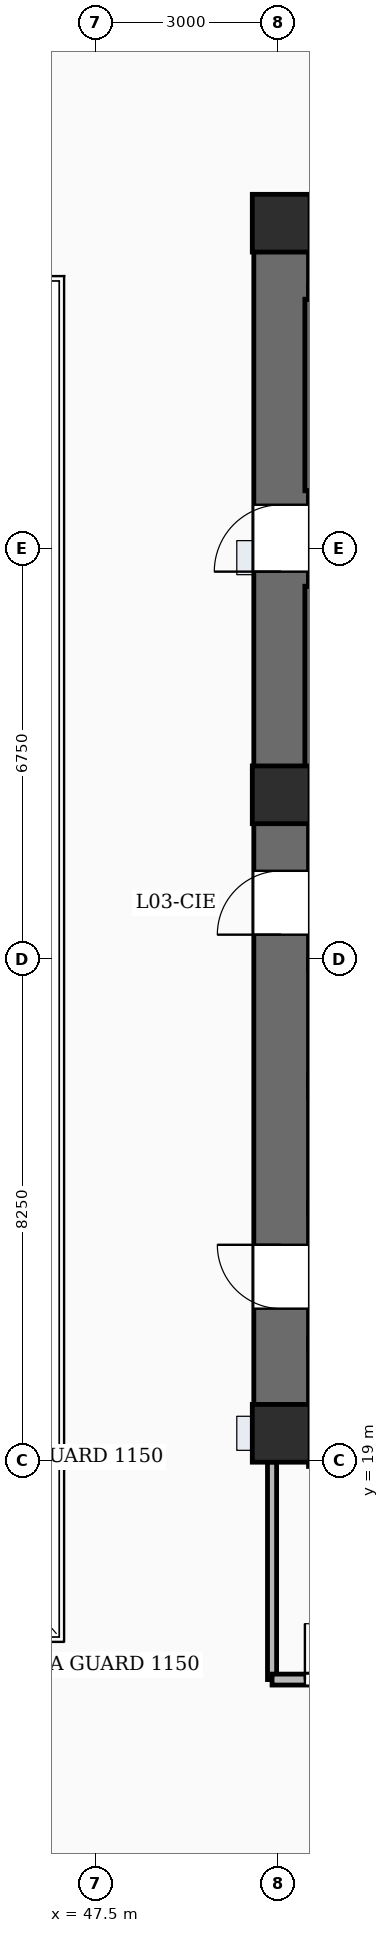
"""IFC4 building model, lengths in metres.
Left out: names, types, materials, properties, quantities, classifications, styles, units other than length and angle.
Written with IfcOpenShell. Run it as: python <this file> out.ifc"""

import sys

from ifc_helpers import new_model, si_unit, direction, frame, frame_2d, origin, origin_2d, place, context, subcontext, project, spatial, rectangle, extrude, element, fill, save


model = new_model("IFC4")
c1 = context("Model", 3, precision=1e-05, world=origin(), true_north=direction((0.0, 1.0)))
c2 = subcontext(c1, "Body", "Model", "MODEL_VIEW")
j1 = project(units=[si_unit("LENGTHUNIT", "METRE"), si_unit("PLANEANGLEUNIT", "RADIAN")], contexts=[c1])
p1 = place(None, origin())
s1 = spatial("IfcSite", under=j1, at=p1, CompositionType="ELEMENT")
p2 = place(p1, origin())
s2 = spatial("IfcBuilding", under=s1, at=p2, CompositionType="ELEMENT")
p3 = place(p2, frame((0.0, 0.0, 18.0)))
s3 = spatial("IfcBuildingStorey", under=s2, at=p3, CompositionType="ELEMENT", Elevation=18.0)
p4 = place(p3, frame((50.55, 19.0, -0.35), z_axis=(0.0, 0.0, 1.0), x_axis=(0.0, 1.0, 0.0)))
e1 = element("IfcWall", 1, at=p4, inside=s3, PredefinedType="SHEAR", context=c2, shape_type="SweptSolid", body=[
    extrude(rectangle(XDim=20.8, YDim=0.9, at=frame_2d((10.4, 0.0))), origin(), (0.0, 0.0, 1.0), 5.0),
])
p5 = place(p4, frame((2.5, 0.0, 0.35)))
e2 = element("IfcOpeningElement", 2, at=p5, cuts=e1, PredefinedType="OPENING", context=c2, shape_type="SweptSolid", body=[
    extrude(rectangle(XDim=1.05, YDim=2.15, at=frame_2d((0.525, 1.075))), frame((0.0, 0.46, 0.0), z_axis=(0.0, -1.0, 0.0), x_axis=(1.0, 0.0, 0.0)), (0.0, 0.0, 1.0), 0.92),
])
p6 = place(p4, frame((8.65, 0.0, 0.35)))
e3 = element("IfcOpeningElement", 3, at=p6, cuts=e1, PredefinedType="OPENING", context=c2, shape_type="SweptSolid", body=[
    extrude(rectangle(XDim=1.05, YDim=2.15, at=frame_2d((0.525, 1.075))), frame((0.0, 0.46, 0.0), z_axis=(0.0, -1.0, 0.0), x_axis=(1.0, 0.0, 0.0)), (0.0, 0.0, 1.0), 0.92),
])
p7 = place(p4, frame((14.62, 0.0, 0.35)))
e4 = element("IfcOpeningElement", 4, at=p7, cuts=e1, PredefinedType="OPENING", context=c2, shape_type="SweptSolid", body=[
    extrude(rectangle(XDim=1.1, YDim=2.15, at=frame_2d((0.55, 1.075))), frame((0.0, 0.46, 0.0), z_axis=(0.0, -1.0, 0.0), x_axis=(1.0, 0.0, 0.0)), (0.0, 0.0, 1.0), 0.92),
])
for number, where, z_axis, x_axis in (
    (5, (51.0, 19.45, -0.35), (0.0, 0.0, 1.0), (1.0, 0.0, 0.0)),
    (6, (51.0, 39.35, -0.35), (0.0, 0.0, 1.0), (1.0, 0.0, 0.0)),
):
    element("IfcWall", number, at=place(p3, frame(where, z_axis=z_axis, x_axis=x_axis)), inside=s3, PredefinedType="SHEAR", context=c2, shape_type="SweptSolid", body=[
        extrude(rectangle(XDim=8.9, YDim=0.9, at=frame_2d((4.45, 0.0))), origin(), (0.0, 0.0, 1.0), 5.0),
    ])
for number, where, z_axis, x_axis in (
    (7, (50.55, 19.45, -0.35), (0.0, 0.0, 1.0), (1.0, 0.0, 0.0)),
    (8, (50.55, 29.95, -0.35), (0.0, 0.0, 1.0), (1.0, 0.0, 0.0)),
    (9, (50.55, 39.35, -0.35), (0.0, 0.0, 1.0), (1.0, 0.0, 0.0)),
):
    element("IfcColumn", number, at=place(p3, frame(where, z_axis=z_axis, x_axis=x_axis)), inside=s3, PredefinedType="COLUMN", context=c2, shape_type="SweptSolid", body=[
        extrude(rectangle(XDim=0.95, YDim=0.95, at=origin_2d()), origin(), (0.0, 0.0, 1.0), 5.0),
    ])
p8 = place(p3, frame((59.9, 30.03, 0.0), z_axis=(0.0, 0.0, 1.0), x_axis=(-1.0, 0.0, 0.0)))
e10 = element("IfcWall", 10, at=p8, inside=s3, PredefinedType="SOLIDWALL", context=c2, shape_type="SweptSolid", body=[
    extrude(rectangle(XDim=8.9, YDim=0.24, at=frame_2d((4.45, 0.0))), origin(), (0.0, 0.0, 1.0), 4.65),
])
p9 = place(p8, frame((7.38, 0.0, 0.0)))
e11 = element("IfcOpeningElement", 11, at=p9, cuts=e10, PredefinedType="OPENING", context=c2, shape_type="SweptSolid", body=[
    extrude(rectangle(XDim=1.1, YDim=2.15, at=frame_2d((0.55, 1.075))), frame((0.0, 0.13, 0.0), z_axis=(0.0, -1.0, 0.0), x_axis=(1.0, 0.0, 0.0)), (0.0, 0.0, 1.0), 0.26),
])
p10 = place(p3, frame((51.0, 33.5, 0.0), z_axis=(0.0, 0.0, 1.0), x_axis=(1.0, 0.0, 0.0)))
e12 = element("IfcWall", 12, at=p10, inside=s3, PredefinedType="SOLIDWALL", context=c2, shape_type="SweptSolid", body=[
    extrude(rectangle(XDim=8.9, YDim=0.24, at=frame_2d((4.45, 0.0))), origin(), (0.0, 0.0, 1.0), 4.65),
])
p11 = place(p3, frame((51.06, 30.15, 0.0), z_axis=(0.0, 0.0, 1.0), x_axis=(0.0, 1.0, 0.0)))
e13 = element("IfcWall", 13, at=p11, inside=s3, PredefinedType="SOLIDWALL", context=c2, shape_type="SweptSolid", body=[
    extrude(rectangle(XDim=3.23, YDim=0.24, at=frame_2d((1.615, 0.0))), origin(), (0.0, 0.0, 1.0), 4.65),
])
p12 = place(p3, frame((59.9, 34.83, 0.0), z_axis=(0.0, 0.0, 1.0), x_axis=(-1.0, 0.0, 0.0)))
e14 = element("IfcWall", 14, at=p12, inside=s3, PredefinedType="SOLIDWALL", context=c2, shape_type="SweptSolid", body=[
    extrude(rectangle(XDim=8.9, YDim=0.24, at=frame_2d((4.45, 0.0))), origin(), (0.0, 0.0, 1.0), 4.65),
])
p13 = place(p12, frame((7.42, 0.0, 0.0)))
e15 = element("IfcOpeningElement", 15, at=p13, cuts=e14, PredefinedType="OPENING", context=c2, shape_type="SweptSolid", body=[
    extrude(rectangle(XDim=1.1, YDim=2.15, at=frame_2d((0.55, 1.075))), frame((0.0, 0.13, 0.0), z_axis=(0.0, -1.0, 0.0), x_axis=(1.0, 0.0, 0.0)), (0.0, 0.0, 1.0), 0.26),
])
p14 = place(p3, frame((51.0, 38.22, 0.0), z_axis=(0.0, 0.0, 1.0), x_axis=(1.0, 0.0, 0.0)))
e16 = element("IfcWall", 16, at=p14, inside=s3, PredefinedType="SOLIDWALL", context=c2, shape_type="SweptSolid", body=[
    extrude(rectangle(XDim=8.9, YDim=0.24, at=frame_2d((4.45, 0.0))), origin(), (0.0, 0.0, 1.0), 4.65),
])
p15 = place(p3, frame((51.06, 34.95, 0.0), z_axis=(0.0, 0.0, 1.0), x_axis=(0.0, 1.0, 0.0)))
e17 = element("IfcWall", 17, at=p15, inside=s3, PredefinedType="SOLIDWALL", context=c2, shape_type="SweptSolid", body=[
    extrude(rectangle(XDim=3.15, YDim=0.24, at=frame_2d((1.575, 0.0))), origin(), (0.0, 0.0, 1.0), 4.65),
])
for number, where, z_axis, x_axis in (
    (18, (51.0, 20.905, 0.0), (0.0, 0.0, 1.0), (1.0, 0.0, 0.0)),
    (19, (51.0, 18.995, 0.0), (0.0, 0.0, 1.0), (1.0, 0.0, 0.0)),
):
    element("IfcWall", number, at=place(p3, frame(where, z_axis=z_axis, x_axis=x_axis)), inside=s3, PredefinedType="SOLIDWALL", context=c2, shape_type="SweptSolid", body=[
        extrude(rectangle(XDim=2.79, YDim=0.18, at=frame_2d((1.395, 0.0))), origin(), (0.0, 0.0, 1.0), 4.65),
    ])
for number, where, z_axis, x_axis in (
    (20, (51.0, 25.055, 0.0), (0.0, 0.0, 1.0), (1.0, 0.0, 0.0)),
    (21, (51.0, 23.145, 0.0), (0.0, 0.0, 1.0), (1.0, 0.0, 0.0)),
):
    element("IfcWall", number, at=place(p3, frame(where, z_axis=z_axis, x_axis=x_axis)), inside=s3, PredefinedType="SOLIDWALL", context=c2, shape_type="SweptSolid", body=[
        extrude(rectangle(XDim=2.778, YDim=0.18, at=frame_2d((1.389, 0.0))), origin(), (0.0, 0.0, 1.0), 4.65),
    ])
p16 = place(p3, frame((51.0, 27.155, 0.0), z_axis=(0.0, 0.0, 1.0), x_axis=(1.0, 0.0, 0.0)))
e22 = element("IfcWall", 22, at=p16, inside=s3, PredefinedType="SOLIDWALL", context=c2, shape_type="SweptSolid", body=[
    extrude(rectangle(XDim=2.865, YDim=0.18, at=frame_2d((1.433, 0.0))), origin(), (0.0, 0.0, 1.0), 4.65),
])
p17 = place(p16, frame((0.785, 0.0, 0.0)))
e23 = element("IfcOpeningElement", 23, at=p17, cuts=e22, PredefinedType="OPENING", context=c2, shape_type="SweptSolid", body=[
    extrude(rectangle(XDim=1.35, YDim=2.3, at=frame_2d((0.675, 1.15))), frame((0.0, 0.1, 0.0), z_axis=(0.0, -1.0, 0.0), x_axis=(1.0, 0.0, 0.0)), (0.0, 0.0, 1.0), 0.2),
])
p18 = place(p3, frame((51.0, 25.245, 0.0), z_axis=(0.0, 0.0, 1.0), x_axis=(1.0, 0.0, 0.0)))
e24 = element("IfcWall", 24, at=p18, inside=s3, PredefinedType="SOLIDWALL", context=c2, shape_type="SweptSolid", body=[
    extrude(rectangle(XDim=2.865, YDim=0.18, at=frame_2d((1.433, 0.0))), origin(), (0.0, 0.0, 1.0), 4.65),
])
p19 = place(p3, frame((50.4, 15.4, 0.0), z_axis=(0.0, 0.0, 1.0), x_axis=(1.0, 0.0, 0.0)))
e25 = element("IfcWall", 25, at=p19, inside=s3, PredefinedType="SOLIDWALL", context=c2, shape_type="SweptSolid", body=[
    extrude(rectangle(XDim=10.0, YDim=0.18, at=frame_2d((5.0, 0.0))), origin(), (0.0, 0.0, 1.0), 3.71),
])
p20 = place(p19, frame((0.54, 0.0, 0.0)))
e26 = element("IfcOpeningElement", 26, at=p20, cuts=e25, PredefinedType="OPENING", context=c2, shape_type="SweptSolid", body=[
    extrude(rectangle(XDim=0.92, YDim=2.1, at=frame_2d((0.46, 1.05))), frame((0.0, 0.1, 0.0), z_axis=(0.0, -1.0, 0.0), x_axis=(1.0, 0.0, 0.0)), (0.0, 0.0, 1.0), 0.2),
])
p21 = place(p19, frame((2.54, 0.0, 0.0)))
e27 = element("IfcOpeningElement", 27, at=p21, cuts=e25, PredefinedType="OPENING", context=c2, shape_type="SweptSolid", body=[
    extrude(rectangle(XDim=0.92, YDim=2.1, at=frame_2d((0.46, 1.05))), frame((0.0, 0.1, 0.0), z_axis=(0.0, -1.0, 0.0), x_axis=(1.0, 0.0, 0.0)), (0.0, 0.0, 1.0), 0.2),
])
p22 = place(p19, frame((4.54, 0.0, 0.0)))
e28 = element("IfcOpeningElement", 28, at=p22, cuts=e25, PredefinedType="OPENING", context=c2, shape_type="SweptSolid", body=[
    extrude(rectangle(XDim=0.92, YDim=2.1, at=frame_2d((0.46, 1.05))), frame((0.0, 0.1, 0.0), z_axis=(0.0, -1.0, 0.0), x_axis=(1.0, 0.0, 0.0)), (0.0, 0.0, 1.0), 0.2),
])
p23 = place(p19, frame((6.54, 0.0, 0.0)))
e29 = element("IfcOpeningElement", 29, at=p23, cuts=e25, PredefinedType="OPENING", context=c2, shape_type="SweptSolid", body=[
    extrude(rectangle(XDim=0.92, YDim=2.1, at=frame_2d((0.46, 1.05))), frame((0.0, 0.1, 0.0), z_axis=(0.0, -1.0, 0.0), x_axis=(1.0, 0.0, 0.0)), (0.0, 0.0, 1.0), 0.2),
])
p24 = place(p19, frame((8.57, 0.0, 0.0)))
e30 = element("IfcOpeningElement", 30, at=p24, cuts=e25, PredefinedType="OPENING", context=c2, shape_type="SweptSolid", body=[
    extrude(rectangle(XDim=0.86, YDim=2.05, at=frame_2d((0.43, 1.025))), frame((0.0, 0.1, 0.0), z_axis=(0.0, -1.0, 0.0), x_axis=(1.0, 0.0, 0.0)), (0.0, 0.0, 1.0), 0.2),
])
p25 = place(p3, frame((50.4, 15.4, 0.0), z_axis=(0.0, 0.0, 1.0), x_axis=(0.0, 1.0, 0.0)))
e31 = element("IfcWall", 31, at=p25, inside=s3, PredefinedType="PARTITIONING", context=c2, shape_type="SweptSolid", body=[
    extrude(rectangle(XDim=3.58, YDim=0.15, at=frame_2d((1.79, 0.0))), origin(), (0.0, 0.0, 1.0), 3.71),
])
p26 = place(p5, origin())
e32 = element("IfcDoor", 32, at=p26, inside=s3, OperationType="SINGLE_SWING_RIGHT", PredefinedType="DOOR", context=c2, shape_type="SweptSolid", body=[
    extrude(rectangle(XDim=1.05, YDim=2.15, at=frame_2d((0.525, 1.075))), frame((0.0, 0.025, 0.0), z_axis=(0.0, -1.0, 0.0), x_axis=(1.0, 0.0, 0.0)), (0.0, 0.0, 1.0), 0.05),
])
fill(e2, e32)
p27 = place(p6, origin())
e33 = element("IfcDoor", 33, at=p27, inside=s3, OperationType="SINGLE_SWING_LEFT", PredefinedType="DOOR", context=c2, shape_type="SweptSolid", body=[
    extrude(rectangle(XDim=1.05, YDim=2.15, at=frame_2d((0.525, 1.075))), frame((0.0, 0.025, 0.0), z_axis=(0.0, -1.0, 0.0), x_axis=(1.0, 0.0, 0.0)), (0.0, 0.0, 1.0), 0.05),
])
fill(e3, e33)
p28 = place(p7, origin())
e34 = element("IfcDoor", 34, at=p28, inside=s3, OperationType="SINGLE_SWING_LEFT", PredefinedType="DOOR", context=c2, shape_type="SweptSolid", body=[
    extrude(rectangle(XDim=1.1, YDim=2.15, at=frame_2d((0.55, 1.075))), frame((0.0, 0.025, 0.0), z_axis=(0.0, -1.0, 0.0), x_axis=(1.0, 0.0, 0.0)), (0.0, 0.0, 1.0), 0.05),
])
fill(e4, e34)
p29 = place(p20, origin())
e35 = element("IfcDoor", 35, at=p29, inside=s3, OperationType="SINGLE_SWING_LEFT", PredefinedType="DOOR", context=c2, shape_type="SweptSolid", body=[
    extrude(rectangle(XDim=0.92, YDim=2.1, at=frame_2d((0.46, 1.05))), frame((0.0, 0.025, 0.0), z_axis=(0.0, -1.0, 0.0), x_axis=(1.0, 0.0, 0.0)), (0.0, 0.0, 1.0), 0.05),
])
fill(e26, e35)
save(model, sys.argv[1])
